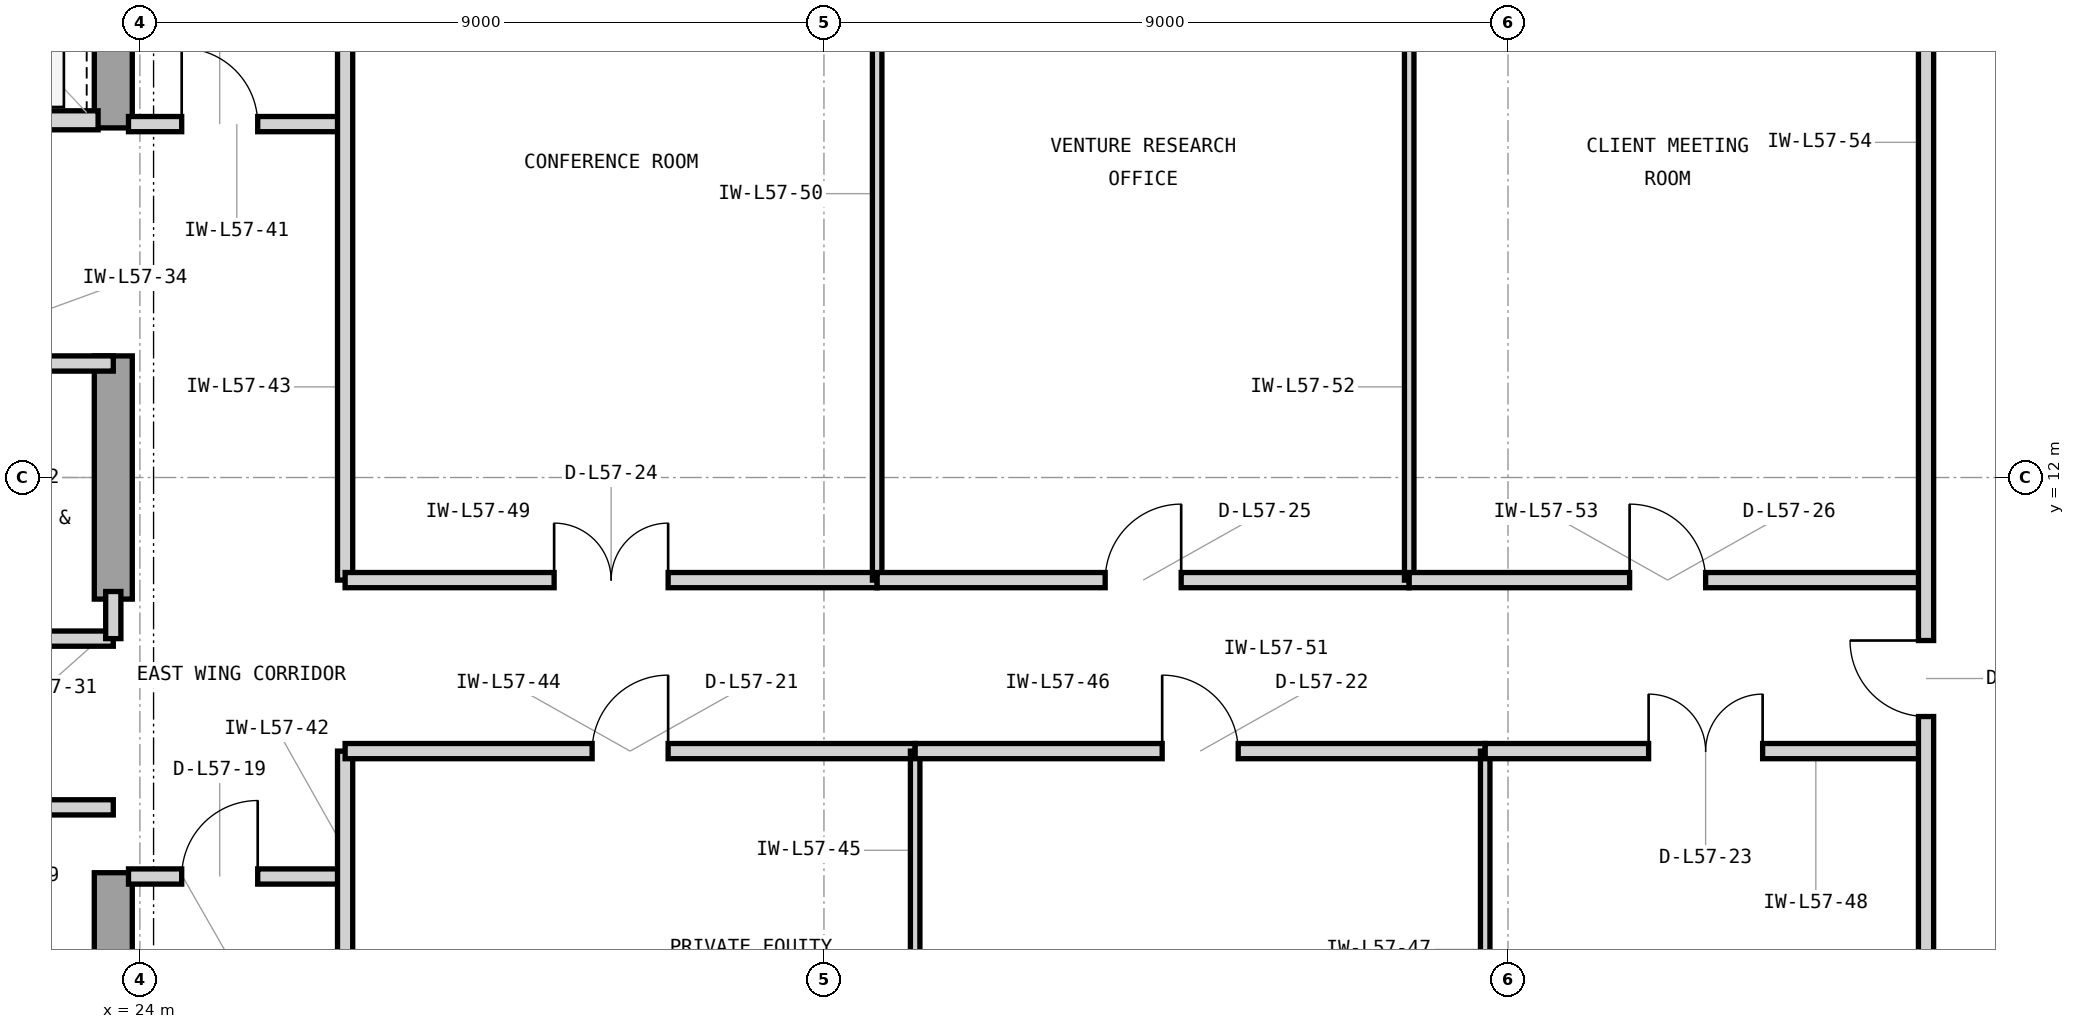
"""IFC4 building model, lengths in metres.
Left out: names, types, materials, properties, quantities, classifications, styles, units other than length and angle.
Written with IfcOpenShell. Run it as: python <this file> out.ifc"""

import sys

from ifc_helpers import new_model, si_unit, direction, frame, frame_2d, origin, place, context, subcontext, project, spatial, rectangle, extrude, element, fill, save


model = new_model("IFC4")
c1 = context("Model", 3, precision=1e-05, world=origin(), true_north=direction((0.0, 1.0)))
c2 = subcontext(c1, "Body", "Model", "MODEL_VIEW")
j1 = project(units=[si_unit("LENGTHUNIT", "METRE"), si_unit("PLANEANGLEUNIT", "RADIAN")], contexts=[c1])
p1 = place(None, origin())
s1 = spatial("IfcSite", under=j1, at=p1, CompositionType="ELEMENT")
p2 = place(p1, origin())
s2 = spatial("IfcBuilding", under=s1, at=p2, CompositionType="ELEMENT")
p3 = place(p2, frame((0.0, 0.0, 235.2)))
s3 = spatial("IfcBuildingStorey", under=s2, at=p3, CompositionType="ELEMENT", Elevation=235.2)
p4 = place(p3, frame((23.65, 3.6, 0.0), z_axis=(0.0, 0.0, 1.0), x_axis=(0.0, 1.0, 0.0)))
e1 = element("IfcWall", 1, at=p4, inside=s3, PredefinedType="SHEAR", context=c2, shape_type="SweptSolid", body=[
    extrude(rectangle(XDim=3.2, YDim=0.5, at=frame_2d((1.6, 0.0))), origin(), (0.0, 0.0, 1.0), 3.9),
])
p5 = place(p3, frame((23.65, 10.4, 0.0), z_axis=(0.0, 0.0, 1.0), x_axis=(0.0, 1.0, 0.0)))
e2 = element("IfcWall", 2, at=p5, inside=s3, PredefinedType="SHEAR", context=c2, shape_type="SweptSolid", body=[
    extrude(rectangle(XDim=3.2, YDim=0.5, at=frame_2d((1.6, 0.0))), origin(), (0.0, 0.0, 1.0), 3.9),
])
p6 = place(p3, frame((23.65, 16.6, 0.0), z_axis=(0.0, 0.0, 1.0), x_axis=(0.0, 1.0, 0.0)))
e3 = element("IfcWall", 3, at=p6, inside=s3, PredefinedType="SHEAR", context=c2, shape_type="SweptSolid", body=[
    extrude(rectangle(XDim=4.05, YDim=0.5, at=frame_2d((2.025, 0.0))), origin(), (0.0, 0.0, 1.0), 3.9),
])
p7 = place(p3, frame((21.05, 16.7, 0.0), z_axis=(0.0, 0.0, 1.0), x_axis=(1.0, 0.0, 0.0)))
e4 = element("IfcWall", 4, at=p7, inside=s3, PredefinedType="PARTITIONING", context=c2, shape_type="SweptSolid", body=[
    extrude(rectangle(XDim=2.4, YDim=0.25, at=frame_2d((1.2, 0.0))), origin(), (0.0, 0.0, 1.0), 3.073),
])
p8 = place(p7, frame((0.52, 0.0, 0.0)))
e5 = element("IfcOpeningElement", 5, at=p8, cuts=e4, PredefinedType="OPENING", context=c2, shape_type="SweptSolid", body=[
    extrude(rectangle(XDim=1.15, YDim=2.25, at=frame_2d((0.575, 1.125))), frame((0.0, 0.135, 0.0), z_axis=(0.0, -1.0, 0.0), x_axis=(1.0, 0.0, 0.0)), (0.0, 0.0, 1.0), 0.27),
])
p9 = place(p3, frame((20.85, 7.66, 0.0), z_axis=(0.0, 0.0, 1.0), x_axis=(1.0, 0.0, 0.0)))
e6 = element("IfcWall", 6, at=p9, inside=s3, PredefinedType="PARTITIONING", context=c2, shape_type="SweptSolid", body=[
    extrude(rectangle(XDim=2.8, YDim=0.2, at=frame_2d((1.4, 0.0))), origin(), (0.0, 0.0, 1.0), 3.69),
])
p10 = place(p9, frame((0.95, 0.0, 0.0)))
e7 = element("IfcOpeningElement", 7, at=p10, cuts=e6, PredefinedType="OPENING", context=c2, shape_type="SweptSolid", body=[
    extrude(rectangle(XDim=0.9, YDim=2.1, at=frame_2d((0.45, 1.05))), frame((0.0, 0.11, 0.0), z_axis=(0.0, -1.0, 0.0), x_axis=(1.0, 0.0, 0.0)), (0.0, 0.0, 1.0), 0.22),
])
p11 = place(p3, frame((14.825, 9.88, 0.0), z_axis=(0.0, 0.0, 1.0), x_axis=(1.0, 0.0, 0.0)))
e8 = element("IfcWall", 8, at=p11, inside=s3, PredefinedType="PARTITIONING", context=c2, shape_type="SweptSolid", body=[
    extrude(rectangle(XDim=8.825, YDim=0.2, at=frame_2d((4.413, 0.0))), origin(), (0.0, 0.0, 1.0), 3.69),
])
p12 = place(p3, frame((23.65, 9.88, 0.0), z_axis=(0.0, 0.0, 1.0), x_axis=(0.0, 1.0, 0.0)))
e9 = element("IfcWall", 9, at=p12, inside=s3, PredefinedType="PARTITIONING", context=c2, shape_type="SweptSolid", body=[
    extrude(rectangle(XDim=0.62, YDim=0.2, at=frame_2d((0.31, 0.0))), origin(), (0.0, 0.0, 1.0), 3.69),
])
p13 = place(p3, frame((19.9, 13.5, 0.0), z_axis=(0.0, 0.0, 1.0), x_axis=(1.0, 0.0, 0.0)))
e10 = element("IfcWall", 10, at=p13, inside=s3, PredefinedType="PARTITIONING", context=c2, shape_type="SweptSolid", body=[
    extrude(rectangle(XDim=3.75, YDim=0.2, at=frame_2d((1.875, 0.0))), origin(), (0.0, 0.0, 1.0), 3.073),
])
p14 = place(p13, frame((1.4, 0.0, 0.0)))
e11 = element("IfcOpeningElement", 11, at=p14, cuts=e10, PredefinedType="OPENING", context=c2, shape_type="SweptSolid", body=[
    extrude(rectangle(XDim=0.95, YDim=2.1, at=frame_2d((0.475, 1.05))), frame((0.0, 0.11, 0.0), z_axis=(0.0, -1.0, 0.0), x_axis=(1.0, 0.0, 0.0)), (0.0, 0.0, 1.0), 0.22),
])
p15 = place(p3, frame((23.85, 6.75, 0.0), z_axis=(0.0, 0.0, 1.0), x_axis=(1.0, 0.0, 0.0)))
e12 = element("IfcWall", 12, at=p15, inside=s3, PredefinedType="PARTITIONING", context=c2, shape_type="SweptSolid", body=[
    extrude(rectangle(XDim=2.85, YDim=0.2, at=frame_2d((1.425, 0.0))), origin(), (0.0, 0.0, 1.0), 3.69),
])
p16 = place(p15, frame((0.7, 0.0, 0.0)))
e13 = element("IfcOpeningElement", 13, at=p16, cuts=e12, PredefinedType="OPENING", context=c2, shape_type="SweptSolid", body=[
    extrude(rectangle(XDim=1.0, YDim=2.15, at=frame_2d((0.5, 1.075))), frame((0.0, 0.11, 0.0), z_axis=(0.0, -1.0, 0.0), x_axis=(1.0, 0.0, 0.0)), (0.0, 0.0, 1.0), 0.22),
])
p17 = place(p3, frame((23.85, 16.65, 0.0), z_axis=(0.0, 0.0, 1.0), x_axis=(1.0, 0.0, 0.0)))
e14 = element("IfcWall", 14, at=p17, inside=s3, PredefinedType="PARTITIONING", context=c2, shape_type="SweptSolid", body=[
    extrude(rectangle(XDim=2.85, YDim=0.2, at=frame_2d((1.425, 0.0))), origin(), (0.0, 0.0, 1.0), 3.69),
])
p18 = place(p17, frame((0.7, 0.0, 0.0)))
e15 = element("IfcOpeningElement", 15, at=p18, cuts=e14, PredefinedType="OPENING", context=c2, shape_type="SweptSolid", body=[
    extrude(rectangle(XDim=1.0, YDim=2.15, at=frame_2d((0.5, 1.075))), frame((0.0, 0.11, 0.0), z_axis=(0.0, -1.0, 0.0), x_axis=(1.0, 0.0, 0.0)), (0.0, 0.0, 1.0), 0.22),
])
p19 = place(p3, frame((26.7, 3.18, 0.0), z_axis=(0.0, 0.0, 1.0), x_axis=(0.0, 1.0, 0.0)))
e16 = element("IfcWall", 16, at=p19, inside=s3, PredefinedType="PARTITIONING", context=c2, shape_type="SweptSolid", body=[
    extrude(rectangle(XDim=5.22, YDim=0.2, at=frame_2d((2.61, 0.0))), origin(), (0.0, 0.0, 1.0), 3.69),
])
p20 = place(p3, frame((26.7, 10.65, 0.0), z_axis=(0.0, 0.0, 1.0), x_axis=(0.0, 1.0, 0.0)))
e17 = element("IfcWall", 17, at=p20, inside=s3, PredefinedType="PARTITIONING", context=c2, shape_type="SweptSolid", body=[
    extrude(rectangle(XDim=10.17, YDim=0.2, at=frame_2d((5.085, 0.0))), origin(), (0.0, 0.0, 1.0), 3.69),
])
p21 = place(p3, frame((26.7, 8.4, 0.0), z_axis=(0.0, 0.0, 1.0), x_axis=(1.0, 0.0, 0.0)))
e18 = element("IfcWall", 18, at=p21, inside=s3, PredefinedType="PARTITIONING", context=c2, shape_type="SweptSolid", body=[
    extrude(rectangle(XDim=7.5, YDim=0.2, at=frame_2d((3.75, 0.0))), origin(), (0.0, 0.0, 1.0), 3.69),
])
p22 = place(p21, frame((3.25, 0.0, 0.0)))
e19 = element("IfcOpeningElement", 19, at=p22, cuts=e18, PredefinedType="OPENING", context=c2, shape_type="SweptSolid", body=[
    extrude(rectangle(XDim=1.0, YDim=2.15, at=frame_2d((0.5, 1.075))), frame((0.0, 0.11, 0.0), z_axis=(0.0, -1.0, 0.0), x_axis=(1.0, 0.0, 0.0)), (0.0, 0.0, 1.0), 0.22),
])
p23 = place(p3, frame((34.2, 3.18, 0.0), z_axis=(0.0, 0.0, 1.0), x_axis=(0.0, 1.0, 0.0)))
e20 = element("IfcWall", 20, at=p23, inside=s3, PredefinedType="PARTITIONING", context=c2, shape_type="SweptSolid", body=[
    extrude(rectangle(XDim=5.22, YDim=0.125, at=frame_2d((2.61, 0.0))), origin(), (0.0, 0.0, 1.0), 3.69),
])
p24 = place(p3, frame((34.2, 8.4, 0.0), z_axis=(0.0, 0.0, 1.0), x_axis=(1.0, 0.0, 0.0)))
e21 = element("IfcWall", 21, at=p24, inside=s3, PredefinedType="PARTITIONING", context=c2, shape_type="SweptSolid", body=[
    extrude(rectangle(XDim=7.5, YDim=0.2, at=frame_2d((3.75, 0.0))), origin(), (0.0, 0.0, 1.0), 3.69),
])
p25 = place(p24, frame((3.25, 0.0, 0.0)))
e22 = element("IfcOpeningElement", 22, at=p25, cuts=e21, PredefinedType="OPENING", context=c2, shape_type="SweptSolid", body=[
    extrude(rectangle(XDim=1.0, YDim=2.15, at=frame_2d((0.5, 1.075))), frame((0.0, 0.11, 0.0), z_axis=(0.0, -1.0, 0.0), x_axis=(1.0, 0.0, 0.0)), (0.0, 0.0, 1.0), 0.22),
])
p26 = place(p3, frame((41.7, 3.18, 0.0), z_axis=(0.0, 0.0, 1.0), x_axis=(0.0, 1.0, 0.0)))
e23 = element("IfcWall", 23, at=p26, inside=s3, PredefinedType="PARTITIONING", context=c2, shape_type="SweptSolid", body=[
    extrude(rectangle(XDim=5.22, YDim=0.125, at=frame_2d((2.61, 0.0))), origin(), (0.0, 0.0, 1.0), 3.69),
])
p27 = place(p3, frame((41.7, 8.4, 0.0), z_axis=(0.0, 0.0, 1.0), x_axis=(1.0, 0.0, 0.0)))
e24 = element("IfcWall", 24, at=p27, inside=s3, PredefinedType="PARTITIONING", context=c2, shape_type="SweptSolid", body=[
    extrude(rectangle(XDim=5.8, YDim=0.2, at=frame_2d((2.9, 0.0))), origin(), (0.0, 0.0, 1.0), 3.69),
])
p28 = place(p27, frame((2.15, 0.0, 0.0)))
e25 = element("IfcOpeningElement", 25, at=p28, cuts=e24, PredefinedType="OPENING", context=c2, shape_type="SweptSolid", body=[
    extrude(rectangle(XDim=1.5, YDim=2.3, at=frame_2d((0.75, 1.15))), frame((0.0, 0.11, 0.0), z_axis=(0.0, -1.0, 0.0), x_axis=(1.0, 0.0, 0.0)), (0.0, 0.0, 1.0), 0.22),
])
p29 = place(p3, frame((26.7, 10.65, 0.0), z_axis=(0.0, 0.0, 1.0), x_axis=(1.0, 0.0, 0.0)))
e26 = element("IfcWall", 26, at=p29, inside=s3, PredefinedType="PARTITIONING", context=c2, shape_type="SweptSolid", body=[
    extrude(rectangle(XDim=7.0, YDim=0.2, at=frame_2d((3.5, 0.0))), origin(), (0.0, 0.0, 1.0), 3.69),
])
p30 = place(p29, frame((2.75, 0.0, 0.0)))
e27 = element("IfcOpeningElement", 27, at=p30, cuts=e26, PredefinedType="OPENING", context=c2, shape_type="SweptSolid", body=[
    extrude(rectangle(XDim=1.5, YDim=2.3, at=frame_2d((0.75, 1.15))), frame((0.0, 0.11, 0.0), z_axis=(0.0, -1.0, 0.0), x_axis=(1.0, 0.0, 0.0)), (0.0, 0.0, 1.0), 0.22),
])
p31 = place(p3, frame((33.7, 10.65, 0.0), z_axis=(0.0, 0.0, 1.0), x_axis=(0.0, 1.0, 0.0)))
e28 = element("IfcWall", 28, at=p31, inside=s3, PredefinedType="PARTITIONING", context=c2, shape_type="SweptSolid", body=[
    extrude(rectangle(XDim=10.17, YDim=0.125, at=frame_2d((5.085, 0.0))), origin(), (0.0, 0.0, 1.0), 3.69),
])
p32 = place(p3, frame((33.7, 10.65, 0.0), z_axis=(0.0, 0.0, 1.0), x_axis=(1.0, 0.0, 0.0)))
e29 = element("IfcWall", 29, at=p32, inside=s3, PredefinedType="PARTITIONING", context=c2, shape_type="SweptSolid", body=[
    extrude(rectangle(XDim=7.0, YDim=0.2, at=frame_2d((3.5, 0.0))), origin(), (0.0, 0.0, 1.0), 3.69),
])
p33 = place(p32, frame((3.0, 0.0, 0.0)))
e30 = element("IfcOpeningElement", 30, at=p33, cuts=e29, PredefinedType="OPENING", context=c2, shape_type="SweptSolid", body=[
    extrude(rectangle(XDim=1.0, YDim=2.15, at=frame_2d((0.5, 1.075))), frame((0.0, 0.11, 0.0), z_axis=(0.0, -1.0, 0.0), x_axis=(1.0, 0.0, 0.0)), (0.0, 0.0, 1.0), 0.22),
])
p34 = place(p3, frame((40.7, 10.65, 0.0), z_axis=(0.0, 0.0, 1.0), x_axis=(0.0, 1.0, 0.0)))
e31 = element("IfcWall", 31, at=p34, inside=s3, PredefinedType="PARTITIONING", context=c2, shape_type="SweptSolid", body=[
    extrude(rectangle(XDim=10.17, YDim=0.125, at=frame_2d((5.085, 0.0))), origin(), (0.0, 0.0, 1.0), 3.69),
])
p35 = place(p3, frame((40.7, 10.65, 0.0), z_axis=(0.0, 0.0, 1.0), x_axis=(1.0, 0.0, 0.0)))
e32 = element("IfcWall", 32, at=p35, inside=s3, PredefinedType="PARTITIONING", context=c2, shape_type="SweptSolid", body=[
    extrude(rectangle(XDim=6.8, YDim=0.2, at=frame_2d((3.4, 0.0))), origin(), (0.0, 0.0, 1.0), 3.69),
])
p36 = place(p35, frame((2.9, 0.0, 0.0)))
e33 = element("IfcOpeningElement", 33, at=p36, cuts=e32, PredefinedType="OPENING", context=c2, shape_type="SweptSolid", body=[
    extrude(rectangle(XDim=1.0, YDim=2.15, at=frame_2d((0.5, 1.075))), frame((0.0, 0.11, 0.0), z_axis=(0.0, -1.0, 0.0), x_axis=(1.0, 0.0, 0.0)), (0.0, 0.0, 1.0), 0.22),
])
p37 = place(p3, frame((47.5, 3.18, 0.0), z_axis=(0.0, 0.0, 1.0), x_axis=(0.0, 1.0, 0.0)))
e34 = element("IfcWall", 34, at=p37, inside=s3, PredefinedType="PARTITIONING", context=c2, shape_type="SweptSolid", body=[
    extrude(rectangle(XDim=17.64, YDim=0.2, at=frame_2d((8.82, 0.0))), origin(), (0.0, 0.0, 1.0), 3.69),
])
p38 = place(p37, frame((5.675, 0.0, 0.0)))
e35 = element("IfcOpeningElement", 35, at=p38, cuts=e34, PredefinedType="OPENING", context=c2, shape_type="SweptSolid", body=[
    extrude(rectangle(XDim=1.0, YDim=2.15, at=frame_2d((0.5, 1.075))), frame((0.0, 0.11, 0.0), z_axis=(0.0, -1.0, 0.0), x_axis=(1.0, 0.0, 0.0)), (0.0, 0.0, 1.0), 0.22),
])
p39 = place(p16, origin())
e36 = element("IfcDoor", 36, at=p39, inside=s3, OperationType="SINGLE_SWING_RIGHT", PredefinedType="DOOR", context=c2, shape_type="SweptSolid", body=[
    extrude(rectangle(XDim=1.0, YDim=2.15, at=frame_2d((0.5, 1.075))), frame((0.0, 0.025, 0.0), z_axis=(0.0, -1.0, 0.0), x_axis=(1.0, 0.0, 0.0)), (0.0, 0.0, 1.0), 0.05),
])
fill(e13, e36)
p40 = place(p18, origin())
e37 = element("IfcDoor", 37, at=p40, inside=s3, OperationType="SINGLE_SWING_LEFT", PredefinedType="DOOR", context=c2, shape_type="SweptSolid", body=[
    extrude(rectangle(XDim=1.0, YDim=2.15, at=frame_2d((0.5, 1.075))), frame((0.0, 0.025, 0.0), z_axis=(0.0, -1.0, 0.0), x_axis=(1.0, 0.0, 0.0)), (0.0, 0.0, 1.0), 0.05),
])
fill(e15, e37)
p41 = place(p22, origin())
e38 = element("IfcDoor", 38, at=p41, inside=s3, OperationType="SINGLE_SWING_RIGHT", PredefinedType="DOOR", context=c2, shape_type="SweptSolid", body=[
    extrude(rectangle(XDim=1.0, YDim=2.15, at=frame_2d((0.5, 1.075))), frame((0.0, 0.025, 0.0), z_axis=(0.0, -1.0, 0.0), x_axis=(1.0, 0.0, 0.0)), (0.0, 0.0, 1.0), 0.05),
])
fill(e19, e38)
p42 = place(p25, origin())
e39 = element("IfcDoor", 39, at=p42, inside=s3, OperationType="SINGLE_SWING_LEFT", PredefinedType="DOOR", context=c2, shape_type="SweptSolid", body=[
    extrude(rectangle(XDim=1.0, YDim=2.15, at=frame_2d((0.5, 1.075))), frame((0.0, 0.025, 0.0), z_axis=(0.0, -1.0, 0.0), x_axis=(1.0, 0.0, 0.0)), (0.0, 0.0, 1.0), 0.05),
])
fill(e22, e39)
p43 = place(p28, origin())
e40 = element("IfcDoor", 40, at=p43, inside=s3, OperationType="DOUBLE_DOOR_SINGLE_SWING", PredefinedType="DOOR", context=c2, shape_type="SweptSolid", body=[
    extrude(rectangle(XDim=1.5, YDim=2.3, at=frame_2d((0.75, 1.15))), frame((0.0, 0.025, 0.0), z_axis=(0.0, -1.0, 0.0), x_axis=(1.0, 0.0, 0.0)), (0.0, 0.0, 1.0), 0.05),
])
fill(e25, e40)
p44 = place(p30, origin())
e41 = element("IfcDoor", 41, at=p44, inside=s3, OperationType="DOUBLE_DOOR_SINGLE_SWING", PredefinedType="DOOR", context=c2, shape_type="SweptSolid", body=[
    extrude(rectangle(XDim=1.5, YDim=2.3, at=frame_2d((0.75, 1.15))), frame((0.0, 0.025, 0.0), z_axis=(0.0, -1.0, 0.0), x_axis=(1.0, 0.0, 0.0)), (0.0, 0.0, 1.0), 0.05),
])
fill(e27, e41)
p45 = place(p33, origin())
e42 = element("IfcDoor", 42, at=p45, inside=s3, OperationType="SINGLE_SWING_RIGHT", PredefinedType="DOOR", context=c2, shape_type="SweptSolid", body=[
    extrude(rectangle(XDim=1.0, YDim=2.15, at=frame_2d((0.5, 1.075))), frame((0.0, 0.025, 0.0), z_axis=(0.0, -1.0, 0.0), x_axis=(1.0, 0.0, 0.0)), (0.0, 0.0, 1.0), 0.05),
])
fill(e30, e42)
p46 = place(p36, origin())
e43 = element("IfcDoor", 43, at=p46, inside=s3, OperationType="SINGLE_SWING_LEFT", PredefinedType="DOOR", context=c2, shape_type="SweptSolid", body=[
    extrude(rectangle(XDim=1.0, YDim=2.15, at=frame_2d((0.5, 1.075))), frame((0.0, 0.025, 0.0), z_axis=(0.0, -1.0, 0.0), x_axis=(1.0, 0.0, 0.0)), (0.0, 0.0, 1.0), 0.05),
])
fill(e33, e43)
p47 = place(p38, origin())
e44 = element("IfcDoor", 44, at=p47, inside=s3, OperationType="SINGLE_SWING_RIGHT", PredefinedType="DOOR", context=c2, shape_type="SweptSolid", body=[
    extrude(rectangle(XDim=1.0, YDim=2.15, at=frame_2d((0.5, 1.075))), frame((0.0, 0.025, 0.0), z_axis=(0.0, -1.0, 0.0), x_axis=(1.0, 0.0, 0.0)), (0.0, 0.0, 1.0), 0.05),
])
fill(e35, e44)
save(model, sys.argv[1])
